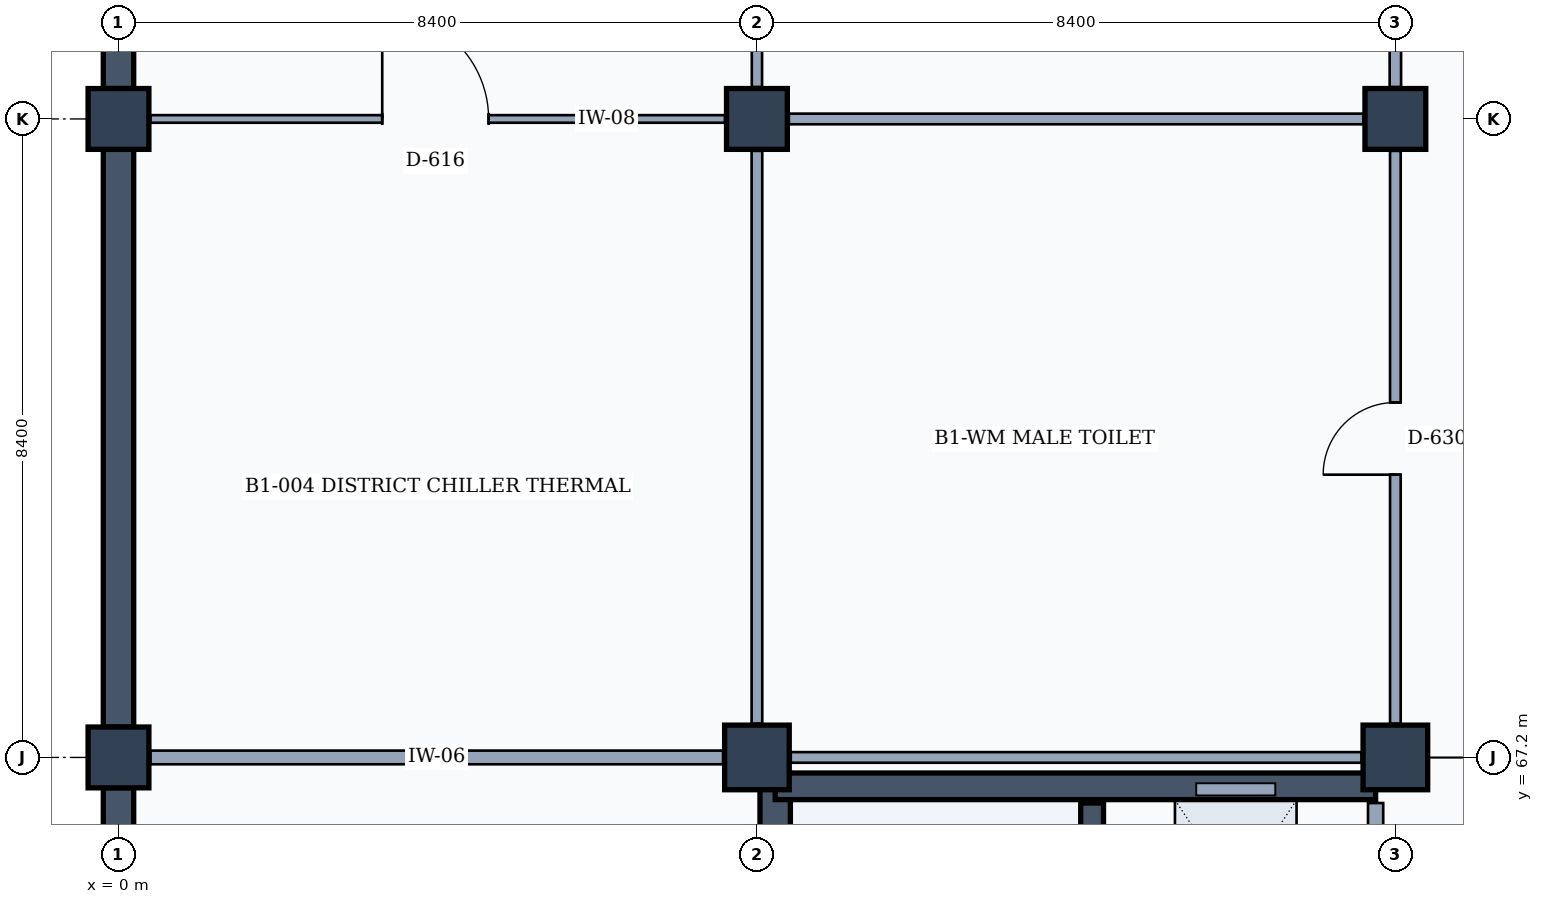
"""IFC4 building model, lengths in metres.
Left out: names, types, materials, properties, quantities, classifications, styles, units other than length and angle.
Written with IfcOpenShell. Run it as: python <this file> out.ifc"""

import sys

from ifc_helpers import new_model, si_unit, direction, frame, frame_2d, origin, origin_2d, place, context, subcontext, project, spatial, rectangle, extrude, element, fill, save


model = new_model("IFC4")
c1 = context("Model", 3, precision=1e-05, world=origin(), true_north=direction((0.0, 1.0)))
c2 = subcontext(c1, "Body", "Model", "MODEL_VIEW")
j1 = project(units=[si_unit("LENGTHUNIT", "METRE"), si_unit("PLANEANGLEUNIT", "RADIAN")], contexts=[c1])
p1 = place(None, origin())
s1 = spatial("IfcSite", under=j1, at=p1, CompositionType="ELEMENT")
p2 = place(p1, origin())
s2 = spatial("IfcBuilding", under=s1, at=p2, CompositionType="ELEMENT")
p3 = place(p2, frame((0.0, 0.0, -4.2)))
s3 = spatial("IfcBuildingStorey", under=s2, at=p3, CompositionType="ELEMENT", Elevation=-4.2)
for number, where, z_axis, x_axis in (
    (1, (0.0, 67.2, 0.0), (0.0, 0.0, 1.0), (1.0, 0.0, 0.0)),
    (2, (0.0, 75.6, 0.0), (0.0, 0.0, 1.0), (1.0, 0.0, 0.0)),
):
    element("IfcColumn", number, at=place(p3, frame(where, z_axis=z_axis, x_axis=x_axis)), inside=s3, PredefinedType="COLUMN", context=c2, shape_type="SweptSolid", body=[
        extrude(rectangle(XDim=0.8, YDim=0.8, at=origin_2d()), origin(), (0.0, 0.0, 1.0), 4.2),
    ])
p4 = place(p3, frame((8.4, 67.2, 0.0), z_axis=(0.0, 0.0, 1.0), x_axis=(1.0, 0.0, 0.0)))
e3 = element("IfcColumn", 3, at=p4, inside=s3, PredefinedType="COLUMN", context=c2, shape_type="SweptSolid", body=[
    extrude(rectangle(XDim=0.85, YDim=0.85, at=origin_2d()), origin(), (0.0, 0.0, 1.0), 4.2),
])
p5 = place(p3, frame((8.4, 75.6, 0.0), z_axis=(0.0, 0.0, 1.0), x_axis=(1.0, 0.0, 0.0)))
e4 = element("IfcColumn", 4, at=p5, inside=s3, PredefinedType="COLUMN", context=c2, shape_type="SweptSolid", body=[
    extrude(rectangle(XDim=0.8, YDim=0.8, at=origin_2d()), origin(), (0.0, 0.0, 1.0), 4.2),
])
p6 = place(p3, frame((16.8, 67.2, 0.0), z_axis=(0.0, 0.0, 1.0), x_axis=(1.0, 0.0, 0.0)))
e5 = element("IfcColumn", 5, at=p6, inside=s3, PredefinedType="COLUMN", context=c2, shape_type="SweptSolid", body=[
    extrude(rectangle(XDim=0.85, YDim=0.85, at=origin_2d()), origin(), (0.0, 0.0, 1.0), 4.2),
])
p7 = place(p3, frame((16.8, 75.6, 0.0), z_axis=(0.0, 0.0, 1.0), x_axis=(1.0, 0.0, 0.0)))
e6 = element("IfcColumn", 6, at=p7, inside=s3, PredefinedType="COLUMN", context=c2, shape_type="SweptSolid", body=[
    extrude(rectangle(XDim=0.8, YDim=0.8, at=origin_2d()), origin(), (0.0, 0.0, 1.0), 4.2),
])
p8 = place(p3, frame((0.0, 59.2, 0.0), z_axis=(0.0, 0.0, 1.0), x_axis=(0.0, 1.0, 0.0)))
e7 = element("IfcWall", 7, at=p8, inside=s3, PredefinedType="STANDARD", context=c2, shape_type="SweptSolid", body=[
    extrude(rectangle(XDim=7.6, YDim=0.4, at=frame_2d((3.8, 0.0))), origin(), (0.0, 0.0, 1.0), 3.88),
])
p9 = place(p3, frame((0.0, 67.6, 0.0), z_axis=(0.0, 0.0, 1.0), x_axis=(0.0, 1.0, 0.0)))
e8 = element("IfcWall", 8, at=p9, inside=s3, PredefinedType="STANDARD", context=c2, shape_type="SweptSolid", body=[
    extrude(rectangle(XDim=7.6, YDim=0.4, at=frame_2d((3.8, 0.0))), origin(), (0.0, 0.0, 1.0), 3.88),
])
p10 = place(p3, frame((0.0, 76.0, 0.0), z_axis=(0.0, 0.0, 1.0), x_axis=(0.0, 1.0, 0.0)))
e9 = element("IfcWall", 9, at=p10, inside=s3, PredefinedType="STANDARD", context=c2, shape_type="SweptSolid", body=[
    extrude(rectangle(XDim=7.6, YDim=0.4, at=frame_2d((3.8, 0.0))), origin(), (0.0, 0.0, 1.0), 3.88),
])
p11 = place(p3, frame((8.64, 59.05, 0.0), z_axis=(0.0, 0.0, 1.0), x_axis=(0.0, 1.0, 0.0)))
e10 = element("IfcWall", 10, at=p11, inside=s3, PredefinedType="SHEAR", context=c2, shape_type="SweptSolid", body=[
    extrude(rectangle(XDim=7.94, YDim=0.4, at=frame_2d((3.97, 0.0))), origin(), (0.0, 0.0, 1.0), 3.9),
])
p12 = place(p3, frame((8.64, 66.82, 0.0), z_axis=(0.0, 0.0, 1.0), x_axis=(1.0, 0.0, 0.0)))
e11 = element("IfcWall", 11, at=p12, inside=s3, PredefinedType="SHEAR", context=c2, shape_type="SweptSolid", body=[
    extrude(rectangle(XDim=7.9, YDim=0.35, at=frame_2d((3.95, 0.0))), origin(), (0.0, 0.0, 1.0), 3.9),
])
p13 = place(p3, frame((16.54, 66.6, 0.0), z_axis=(0.0, 0.0, 1.0), x_axis=(0.0, -1.0, 0.0)))
e12 = element("IfcWall", 12, at=p13, inside=s3, PredefinedType="PARTITIONING", context=c2, shape_type="SweptSolid", body=[
    extrude(rectangle(XDim=7.2, YDim=0.2, at=frame_2d((3.6, 0.0))), origin(), (0.0, 0.0, 1.0), 3.25),
])
p14 = place(p13, frame((3.55, 0.0, 0.0)))
e13 = element("IfcOpeningElement", 13, at=p14, cuts=e12, PredefinedType="OPENING", context=c2, shape_type="SweptSolid", body=[
    extrude(rectangle(XDim=1.1, YDim=2.15, at=frame_2d((0.55, 1.075))), frame((0.0, 0.11, 0.0), z_axis=(0.0, -1.0, 0.0), x_axis=(1.0, 0.0, 0.0)), (0.0, 0.0, 1.0), 0.22),
])
p15 = place(p3, frame((12.81, 59.22, 0.0), z_axis=(0.0, 0.0, 1.0), x_axis=(0.0, 1.0, 0.0)))
e14 = element("IfcWall", 14, at=p15, inside=s3, PredefinedType="SHEAR", context=c2, shape_type="SweptSolid", body=[
    extrude(rectangle(XDim=7.38, YDim=0.3, at=frame_2d((3.69, 0.0))), origin(), (0.0, 0.0, 1.0), 3.9),
])
p16 = place(p15, frame((0.28, 0.0, 0.0)))
e15 = element("IfcOpeningElement", 15, at=p16, cuts=e14, PredefinedType="OPENING", context=c2, shape_type="SweptSolid", body=[
    extrude(rectangle(XDim=1.1, YDim=2.15, at=frame_2d((0.55, 1.075))), frame((0.0, 0.16, 0.0), z_axis=(0.0, -1.0, 0.0), x_axis=(1.0, 0.0, 0.0)), (0.0, 0.0, 1.0), 0.32),
])
p17 = place(p3, frame((0.42, 67.2, 0.0), z_axis=(0.0, 0.0, 1.0), x_axis=(1.0, 0.0, 0.0)))
e16 = element("IfcWall", 16, at=p17, inside=s3, PredefinedType="PARTITIONING", context=c2, shape_type="SweptSolid", body=[
    extrude(rectangle(XDim=7.535, YDim=0.18, at=frame_2d((3.768, 0.0))), origin(), (0.0, 0.0, 1.0), 3.05),
])
p18 = place(p3, frame((8.4, 67.645, 0.0), z_axis=(0.0, 0.0, 1.0), x_axis=(0.0, 1.0, 0.0)))
e17 = element("IfcWall", 17, at=p18, inside=s3, PredefinedType="PARTITIONING", context=c2, shape_type="SweptSolid", body=[
    extrude(rectangle(XDim=7.535, YDim=0.14, at=frame_2d((3.768, 0.0))), origin(), (0.0, 0.0, 1.0), 3.25),
])
p19 = place(p3, frame((0.42, 75.6, 0.0), z_axis=(0.0, 0.0, 1.0), x_axis=(1.0, 0.0, 0.0)))
e18 = element("IfcWall", 18, at=p19, inside=s3, PredefinedType="MOVABLE", context=c2, shape_type="SweptSolid", body=[
    extrude(rectangle(XDim=7.56, YDim=0.1, at=frame_2d((3.78, 0.0))), origin(), (0.0, 0.0, 1.0), 3.05),
])
p20 = place(p19, frame((3.05, 0.0, 0.0)))
e19 = element("IfcOpeningElement", 19, at=p20, cuts=e18, PredefinedType="OPENING", context=c2, shape_type="SweptSolid", body=[
    extrude(rectangle(XDim=1.4, YDim=2.25, at=frame_2d((0.7, 1.125))), frame((0.0, 0.06, 0.0), z_axis=(0.0, -1.0, 0.0), x_axis=(1.0, 0.0, 0.0)), (0.0, 0.0, 1.0), 0.12),
])
p21 = place(p3, frame((8.4, 76.02, 0.0), z_axis=(0.0, 0.0, 1.0), x_axis=(0.0, 1.0, 0.0)))
e20 = element("IfcWall", 20, at=p21, inside=s3, PredefinedType="PARTITIONING", context=c2, shape_type="SweptSolid", body=[
    extrude(rectangle(XDim=7.56, YDim=0.135, at=frame_2d((3.78, 0.0))), origin(), (0.0, 0.0, 1.0), 3.25),
])
p22 = place(p21, frame((3.0, 0.0, 0.0)))
e21 = element("IfcOpeningElement", 21, at=p22, cuts=e20, PredefinedType="OPENING", context=c2, shape_type="SweptSolid", body=[
    extrude(rectangle(XDim=1.5, YDim=2.3, at=frame_2d((0.75, 1.15))), frame((0.0, 0.077, 0.0), z_axis=(0.0, -1.0, 0.0), x_axis=(1.0, 0.0, 0.0)), (0.0, 0.0, 1.0), 0.155),
])
p23 = place(p3, frame((8.845, 67.2, 0.0), z_axis=(0.0, 0.0, 1.0), x_axis=(1.0, 0.0, 0.0)))
e22 = element("IfcWall", 22, at=p23, inside=s3, PredefinedType="PARTITIONING", context=c2, shape_type="SweptSolid", body=[
    extrude(rectangle(XDim=7.51, YDim=0.14, at=frame_2d((3.755, 0.0))), origin(), (0.0, 0.0, 1.0), 3.05),
])
p24 = place(p3, frame((16.8, 67.645, 0.0), z_axis=(0.0, 0.0, 1.0), x_axis=(0.0, 1.0, 0.0)))
e23 = element("IfcWall", 23, at=p24, inside=s3, PredefinedType="PARTITIONING", context=c2, shape_type="SweptSolid", body=[
    extrude(rectangle(XDim=7.535, YDim=0.14, at=frame_2d((3.768, 0.0))), origin(), (0.0, 0.0, 1.0), 3.25),
])
p25 = place(p24, frame((3.275, 0.0, 0.0)))
e24 = element("IfcOpeningElement", 24, at=p25, cuts=e23, PredefinedType="OPENING", context=c2, shape_type="SweptSolid", body=[
    extrude(rectangle(XDim=0.95, YDim=2.15, at=frame_2d((0.475, 1.075))), frame((0.0, 0.08, 0.0), z_axis=(0.0, -1.0, 0.0), x_axis=(1.0, 0.0, 0.0)), (0.0, 0.0, 1.0), 0.16),
])
p26 = place(p3, frame((8.82, 75.6, 0.0), z_axis=(0.0, 0.0, 1.0), x_axis=(1.0, 0.0, 0.0)))
e25 = element("IfcWall", 25, at=p26, inside=s3, PredefinedType="PARTITIONING", context=c2, shape_type="SweptSolid", body=[
    extrude(rectangle(XDim=7.56, YDim=0.14, at=frame_2d((3.78, 0.0))), origin(), (0.0, 0.0, 1.0), 3.05),
])
p27 = place(p3, frame((16.8, 76.02, 0.0), z_axis=(0.0, 0.0, 1.0), x_axis=(0.0, 1.0, 0.0)))
e26 = element("IfcWall", 26, at=p27, inside=s3, PredefinedType="PARTITIONING", context=c2, shape_type="SweptSolid", body=[
    extrude(rectangle(XDim=7.56, YDim=0.15, at=frame_2d((3.78, 0.0))), origin(), (0.0, 0.0, 1.0), 3.25),
])
p28 = place(p27, frame((2.85, 0.0, 0.0)))
e27 = element("IfcOpeningElement", 27, at=p28, cuts=e26, PredefinedType="OPENING", context=c2, shape_type="SweptSolid", body=[
    extrude(rectangle(XDim=1.8, YDim=2.3, at=frame_2d((0.9, 1.15))), frame((0.0, 0.085, 0.0), z_axis=(0.0, -1.0, 0.0), x_axis=(1.0, 0.0, 0.0)), (0.0, 0.0, 1.0), 0.17),
])
p29 = place(p20, origin())
e28 = element("IfcDoor", 28, at=p29, inside=s3, OperationType="SINGLE_SWING_LEFT", PredefinedType="DOOR", context=c2, shape_type="SweptSolid", body=[
    extrude(rectangle(XDim=1.4, YDim=2.25, at=frame_2d((0.7, 1.125))), frame((0.0, 0.025, 0.0), z_axis=(0.0, -1.0, 0.0), x_axis=(1.0, 0.0, 0.0)), (0.0, 0.0, 1.0), 0.05),
])
fill(e19, e28)
p30 = place(p25, origin())
e29 = element("IfcDoor", 29, at=p30, inside=s3, OperationType="SINGLE_SWING_LEFT", PredefinedType="DOOR", context=c2, shape_type="SweptSolid", body=[
    extrude(rectangle(XDim=0.95, YDim=2.15, at=frame_2d((0.475, 1.075))), frame((0.0, 0.025, 0.0), z_axis=(0.0, -1.0, 0.0), x_axis=(1.0, 0.0, 0.0)), (0.0, 0.0, 1.0), 0.05),
])
fill(e24, e29)
save(model, sys.argv[1])
